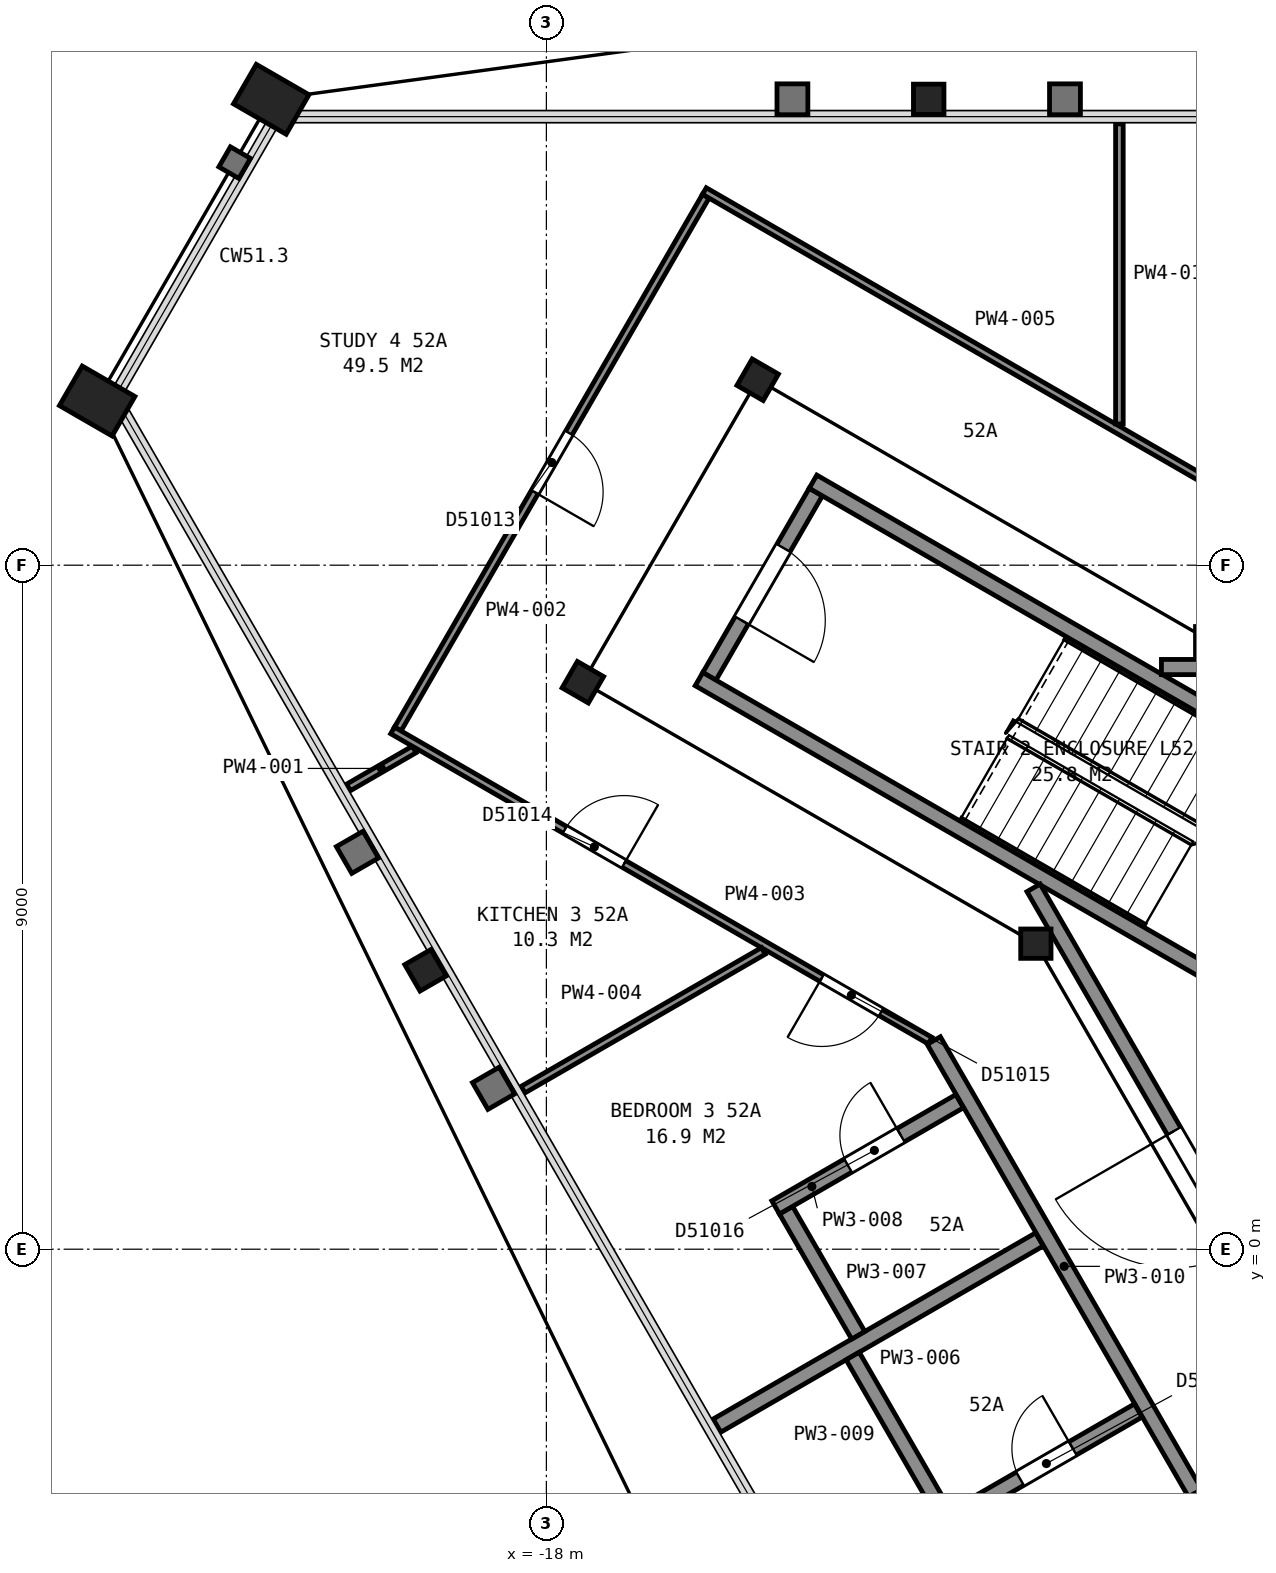
"""IFC4 building model, lengths in metres.
Left out: names, types, materials, properties, quantities, classifications, styles, units other than length and angle.
Written with IfcOpenShell. Run it as: python <this file> out.ifc"""

import sys

from ifc_helpers import new_model, si_unit, direction, frame, frame_2d, origin, origin_2d, place, context, subcontext, project, spatial, rectangle, hollow_rectangle, i_section, extrude, element, fill, save


model = new_model("IFC4")
c1 = context("Model", 3, precision=1e-05, world=origin(), true_north=direction((0.0, 1.0)))
c2 = subcontext(c1, "Body", "Model", "MODEL_VIEW")
j1 = project(units=[si_unit("LENGTHUNIT", "METRE"), si_unit("PLANEANGLEUNIT", "RADIAN")], contexts=[c1])
p1 = place(None, origin())
s1 = spatial("IfcSite", under=j1, at=p1, CompositionType="ELEMENT")
p2 = place(p1, origin())
s2 = spatial("IfcBuilding", under=s1, at=p2, CompositionType="ELEMENT")
p3 = place(p2, frame((0.0, 0.0, 210.1)))
s3 = spatial("IfcBuildingStorey", under=s2, at=p3, CompositionType="ELEMENT", Elevation=210.1)
p4 = place(p3, frame((-12.97, 15.13, 0.0), z_axis=(0.0, 0.0, 1.0), x_axis=(1.0, 0.0, 0.0)))
e1 = element("IfcColumn", 1, at=p4, inside=s3, PredefinedType="COLUMN", context=c2, shape_type="SweptSolid", body=[
    extrude(i_section(OverallWidth=0.401, OverallDepth=0.399, WebThickness=0.025, FlangeThickness=0.04, FilletRadius=0.015, at=origin_2d()), origin(), (0.0, 0.0, 1.0), 3.66),
])
for number, where, z_axis, x_axis in (
    (2, (-21.62, 15.13, 0.0), (0.0, 0.0, 1.0), (0.5, 0.866, 0.0)),
    (3, (-23.91, 11.16, 0.0), (0.0, 0.0, 1.0), (0.5, 0.866, 0.0)),
):
    element("IfcColumn", number, at=place(p3, frame(where, z_axis=z_axis, x_axis=x_axis)), inside=s3, PredefinedType="COLUMN", context=c2, shape_type="SweptSolid", body=[
        extrude(hollow_rectangle(XDim=0.6, YDim=0.8, WallThickness=0.05, at=origin_2d()), origin(), (0.0, 0.0, 1.0), 3.635),
    ])
p5 = place(p3, frame((-19.59, 3.67, 0.0), z_axis=(0.0, 0.0, 1.0), x_axis=(-0.5, 0.866025403784, 0.0)))
e4 = element("IfcColumn", 4, at=p5, inside=s3, PredefinedType="COLUMN", context=c2, shape_type="SweptSolid", body=[
    extrude(i_section(OverallWidth=0.401, OverallDepth=0.399, WebThickness=0.025, FlangeThickness=0.04, FilletRadius=0.015, at=origin_2d()), origin(), (0.0, 0.0, 1.0), 3.66),
])
for number, where, z_axis, x_axis in (
    (5, (-15.22, 11.44, 0.0), (0.0, 0.0, 1.0), (0.5, 0.866, 0.0)),
    (6, (-17.52, 7.46, 0.0), (0.0, 0.0, 1.0), (0.5, 0.866, 0.0)),
):
    element("IfcColumn", number, at=place(p3, frame(where, z_axis=z_axis, x_axis=x_axis)), inside=s3, PredefinedType="COLUMN", context=c2, shape_type="SweptSolid", body=[
        extrude(i_section(OverallWidth=0.401, OverallDepth=0.399, WebThickness=0.025, FlangeThickness=0.04, FilletRadius=0.015, at=origin_2d()), origin(), (0.0, 0.0, 1.0), 3.7),
    ])
p6 = place(p3, frame((-11.56, 4.02, 0.0), z_axis=(0.0, 0.0, 1.0), x_axis=(1.0, 0.0, 0.0)))
e7 = element("IfcColumn", 7, at=p6, inside=s3, PredefinedType="COLUMN", context=c2, shape_type="SweptSolid", body=[
    extrude(i_section(OverallWidth=0.399, OverallDepth=0.386, WebThickness=0.021, FlangeThickness=0.033, FilletRadius=0.015, at=origin_2d()), origin(), (0.0, 0.0, 1.0), 3.7),
])
p7 = place(p3, frame((-14.455, 9.962, 0.0), z_axis=(0.0, 0.0, 1.0), x_axis=(-0.500049511043, -0.865996816683, 0.0)))
e8 = element("IfcWall", 8, at=p7, inside=s3, PredefinedType="PARTITIONING", context=c2, shape_type="SweptSolid", body=[
    extrude(rectangle(XDim=2.8, YDim=0.2, at=frame_2d((1.4, 0.0))), origin(), (0.0, 0.0, 1.0), 3.45),
])
p8 = place(p7, frame((0.85, 0.0, 0.0)))
e9 = element("IfcOpeningElement", 9, at=p8, cuts=e8, PredefinedType="OPENING", context=c2, shape_type="SweptSolid", body=[
    extrude(rectangle(XDim=1.1, YDim=2.1, at=frame_2d((0.55, 1.05))), frame((0.0, 0.11, 0.0), z_axis=(0.0, -1.0, 0.0), x_axis=(1.0, 0.0, 0.0)), (0.0, 0.0, 1.0), 0.22),
])
for number, where, z_axis, x_axis in (
    (10, (-7.678, 2.701, 0.0), (0.0, 0.0, 1.0), (-0.866, 0.5, 0.0)),
    (11, (-6.178, 5.299, 0.0), (0.0, 0.0, 1.0), (-0.866, 0.5, 0.0)),
):
    element("IfcWall", number, at=place(p3, frame(where, z_axis=z_axis, x_axis=x_axis)), inside=s3, PredefinedType="PARTITIONING", context=c2, shape_type="SweptSolid", body=[
        extrude(rectangle(XDim=9.6, YDim=0.2, at=frame_2d((4.8, 0.0))), origin(), (0.0, 0.0, 1.0), 3.45),
    ])
p9 = place(p3, frame((-11.591, 4.755, 0.0), z_axis=(0.0, 0.0, 1.0), x_axis=(0.500043977787, -0.866000011708, 0.0)))
e12 = element("IfcWall", 12, at=p9, inside=s3, PredefinedType="PARTITIONING", context=c2, shape_type="SweptSolid", body=[
    extrude(rectangle(XDim=6.617, YDim=0.2, at=frame_2d((3.308, 0.0))), origin(), (0.0, 0.0, 1.0), 3.45),
])
p10 = place(p9, frame((3.695, 0.0, 0.0)))
e13 = element("IfcOpeningElement", 13, at=p10, cuts=e12, PredefinedType="OPENING", context=c2, shape_type="SweptSolid", body=[
    extrude(rectangle(XDim=1.8, YDim=2.1, at=frame_2d((0.9, 1.05))), frame((0.0, 0.11, 0.0), z_axis=(0.0, -1.0, 0.0), x_axis=(1.0, 0.0, 0.0)), (0.0, 0.0, 1.0), 0.22),
])
p11 = place(p3, frame((-9.908, 7.66, 0.0), z_axis=(0.0, 0.0, 1.0), x_axis=(1.0, 0.0, 0.0)))
e14 = element("IfcWall", 14, at=p11, inside=s3, PredefinedType="PARTITIONING", context=c2, shape_type="SweptSolid", body=[
    extrude(rectangle(XDim=3.621, YDim=0.2, at=frame_2d((1.811, 0.0))), origin(), (0.0, 0.0, 1.0), 3.45),
])
p12 = place(p3, frame((-20.604, 6.076, 0.0), z_axis=(0.0, 0.0, 1.0), x_axis=(0.865855657918, 0.500293893279, 0.0)))
e15 = element("IfcWall", 15, at=p12, inside=s3, PredefinedType="PARTITIONING", context=c2, shape_type="SweptSolid", body=[
    extrude(rectangle(XDim=0.999, YDim=0.1, at=frame_2d((0.499, 0.0))), origin(), (0.0, 0.0, 1.0), 2.713),
])
p13 = place(p3, frame((-19.955, 6.844, 0.0), z_axis=(0.0, 0.0, 1.0), x_axis=(0.500415732313, 0.865785247537, 0.0)))
e16 = element("IfcWall", 16, at=p13, inside=s3, PredefinedType="PARTITIONING", context=c2, shape_type="SweptSolid", body=[
    extrude(rectangle(XDim=8.097, YDim=0.1, at=frame_2d((4.049, 0.0))), origin(), (0.0, 0.0, 1.0), 2.713),
])
p14 = place(p13, frame((3.6, 0.0, 0.0)))
e17 = element("IfcOpeningElement", 17, at=p14, cuts=e16, PredefinedType="OPENING", context=c2, shape_type="SweptSolid", body=[
    extrude(rectangle(XDim=0.9, YDim=2.1, at=frame_2d((0.45, 1.05))), frame((0.0, 0.06, 0.0), z_axis=(0.0, -1.0, 0.0), x_axis=(1.0, 0.0, 0.0)), (0.0, 0.0, 1.0), 0.12),
])
p15 = place(p3, frame((-12.952, 2.744, 0.0), z_axis=(0.0, 0.0, 1.0), x_axis=(-0.86608949446, 0.499888975259, 0.0)))
e18 = element("IfcWall", 18, at=p15, inside=s3, PredefinedType="PARTITIONING", context=c2, shape_type="SweptSolid", body=[
    extrude(rectangle(XDim=8.165, YDim=0.1, at=frame_2d((4.083, 0.0))), origin(), (0.0, 0.0, 1.0), 2.713),
])
p16 = place(p15, frame((4.65, 0.0, 0.0)))
e19 = element("IfcOpeningElement", 19, at=p16, cuts=e18, PredefinedType="OPENING", context=c2, shape_type="SweptSolid", body=[
    extrude(rectangle(XDim=0.9, YDim=2.1, at=frame_2d((0.45, 1.05))), frame((0.0, 0.06, 0.0), z_axis=(0.0, -1.0, 0.0), x_axis=(1.0, 0.0, 0.0)), (0.0, 0.0, 1.0), 0.12),
])
p17 = place(p15, frame((0.746, 0.0, 0.0)))
e20 = element("IfcOpeningElement", 20, at=p17, cuts=e18, PredefinedType="OPENING", context=c2, shape_type="SweptSolid", body=[
    extrude(rectangle(XDim=0.9, YDim=2.1, at=frame_2d((0.45, 1.05))), frame((0.0, 0.06, 0.0), z_axis=(0.0, -1.0, 0.0), x_axis=(1.0, 0.0, 0.0)), (0.0, 0.0, 1.0), 0.12),
])
p18 = place(p3, frame((-18.308, 2.099, 0.0), z_axis=(0.0, 0.0, 1.0), x_axis=(0.866054218355, 0.499950088379, 0.0)))
e21 = element("IfcWall", 21, at=p18, inside=s3, PredefinedType="PARTITIONING", context=c2, shape_type="SweptSolid", body=[
    extrude(rectangle(XDim=3.652, YDim=0.1, at=frame_2d((1.826, 0.0))), origin(), (0.0, 0.0, 1.0), 2.713),
])
p19 = place(p3, frame((-15.921, 13.923, 0.0), z_axis=(0.0, 0.0, 1.0), x_axis=(0.866088973199, -0.499889878377, 0.0)))
e22 = element("IfcWall", 22, at=p19, inside=s3, PredefinedType="PARTITIONING", context=c2, shape_type="SweptSolid", body=[
    extrude(rectangle(XDim=8.163, YDim=0.1, at=frame_2d((4.082, 0.0))), origin(), (0.0, 0.0, 1.0), 2.713),
])
p20 = place(p3, frame((-15.756, -2.321, 0.0), z_axis=(0.0, 0.0, 1.0), x_axis=(0.866042025588, 0.499971209087, 0.0)))
e23 = element("IfcWall", 23, at=p20, inside=s3, PredefinedType="PARTITIONING", context=c2, shape_type="SweptSolid", body=[
    extrude(rectangle(XDim=4.899, YDim=0.2, at=frame_2d((2.45, 0.0))), origin(), (0.0, 0.0, 1.0), 2.713),
])
p21 = place(p3, frame((-14.847, 0.513, 0.0), z_axis=(0.0, 0.0, 1.0), x_axis=(0.499911523785, -0.866076479525, 0.0)))
e24 = element("IfcWall", 24, at=p21, inside=s3, PredefinedType="PARTITIONING", context=c2, shape_type="SweptSolid", body=[
    extrude(rectangle(XDim=1.9, YDim=0.2, at=frame_2d((0.95, 0.0))), origin(), (0.0, 0.0, 1.0), 2.713),
])
p22 = place(p3, frame((-12.563, 1.948, 0.0), z_axis=(0.0, 0.0, 1.0), x_axis=(-0.866041588165, -0.499971966783, 0.0)))
e25 = element("IfcWall", 25, at=p22, inside=s3, PredefinedType="PARTITIONING", context=c2, shape_type="SweptSolid", body=[
    extrude(rectangle(XDim=2.795, YDim=0.2, at=frame_2d((1.397, 0.0))), origin(), (0.0, 0.0, 1.0), 2.713),
])
p23 = place(p22, frame((0.895, 0.0, 0.0)))
e26 = element("IfcOpeningElement", 26, at=p23, cuts=e25, PredefinedType="OPENING", context=c2, shape_type="SweptSolid", body=[
    extrude(rectangle(XDim=0.8, YDim=2.1, at=frame_2d((0.4, 1.05))), frame((0.0, 0.11, 0.0), z_axis=(0.0, -1.0, 0.0), x_axis=(1.0, 0.0, 0.0)), (0.0, 0.0, 1.0), 0.22),
])
p24 = place(p3, frame((-13.97, -1.406, 0.0), z_axis=(0.0, 0.0, 1.0), x_axis=(0.499784123135, -0.866150004481, 0.0)))
e27 = element("IfcWall", 27, at=p24, inside=s3, PredefinedType="PARTITIONING", context=c2, shape_type="SweptSolid", body=[
    extrude(rectangle(XDim=2.399, YDim=0.2, at=frame_2d((1.199, 0.0))), origin(), (0.0, 0.0, 1.0), 2.713),
])
p25 = place(p3, frame((-4.075, -12.545, 0.0), z_axis=(0.0, 0.0, 1.0), x_axis=(-0.499999743747, 0.866025551732, 0.0)))
e28 = element("IfcWall", 28, at=p25, inside=s3, PredefinedType="PARTITIONING", context=c2, shape_type="SweptSolid", body=[
    extrude(rectangle(XDim=17.656, YDim=0.2, at=frame_2d((8.828, 0.0))), origin(), (0.0, 0.0, 1.0), 2.713),
])
p26 = place(p25, frame((9.895, 0.0, 0.0)))
e29 = element("IfcOpeningElement", 29, at=p26, cuts=e28, PredefinedType="OPENING", context=c2, shape_type="SweptSolid", body=[
    extrude(rectangle(XDim=0.9, YDim=2.1, at=frame_2d((0.45, 1.05))), frame((0.0, 0.11, 0.0), z_axis=(0.0, -1.0, 0.0), x_axis=(1.0, 0.0, 0.0)), (0.0, 0.0, 1.0), 0.22),
])
p27 = place(p25, frame((6.622, 0.0, 0.0)))
e30 = element("IfcOpeningElement", 30, at=p27, cuts=e28, PredefinedType="OPENING", context=c2, shape_type="SweptSolid", body=[
    extrude(rectangle(XDim=0.9, YDim=2.1, at=frame_2d((0.45, 1.05))), frame((0.0, 0.11, 0.0), z_axis=(0.0, -1.0, 0.0), x_axis=(1.0, 0.0, 0.0)), (0.0, 0.0, 1.0), 0.22),
])
p28 = place(p25, frame((0.268, 0.0, 0.0)))
e31 = element("IfcOpeningElement", 31, at=p28, cuts=e28, PredefinedType="OPENING", context=c2, shape_type="SweptSolid", body=[
    extrude(rectangle(XDim=0.9, YDim=2.1, at=frame_2d((0.45, 1.05))), frame((0.0, 0.11, 0.0), z_axis=(0.0, -1.0, 0.0), x_axis=(1.0, 0.0, 0.0)), (0.0, 0.0, 1.0), 0.22),
])
p29 = place(p3, frame((-12.808, -3.62, 0.0), z_axis=(0.0, 0.0, 1.0), x_axis=(0.866134024916, 0.499811815469, 0.0)))
e32 = element("IfcWall", 32, at=p29, inside=s3, PredefinedType="PARTITIONING", context=c2, shape_type="SweptSolid", body=[
    extrude(rectangle(XDim=2.996, YDim=0.2, at=frame_2d((1.498, 0.0))), origin(), (0.0, 0.0, 1.0), 2.713),
])
p30 = place(p29, frame((1.2, 0.0, 0.0)))
e33 = element("IfcOpeningElement", 33, at=p30, cuts=e32, PredefinedType="OPENING", context=c2, shape_type="SweptSolid", body=[
    extrude(rectangle(XDim=0.8, YDim=2.1, at=frame_2d((0.4, 1.05))), frame((0.0, 0.11, 0.0), z_axis=(0.0, -1.0, 0.0), x_axis=(1.0, 0.0, 0.0)), (0.0, 0.0, 1.0), 0.22),
])
p31 = place(p3, frame((-10.461, 10.859, 0.0), z_axis=(0.0, 0.0, 1.0), x_axis=(0.0, 1.0, 0.0)))
e34 = element("IfcWall", 34, at=p31, inside=s3, PredefinedType="PARTITIONING", context=c2, shape_type="SweptSolid", body=[
    extrude(rectangle(XDim=3.947, YDim=0.1, at=frame_2d((1.974, 0.0))), origin(), (0.0, 0.0, 1.0), 2.713),
])
p32 = place(p8, origin())
e35 = element("IfcDoor", 35, at=p32, inside=s3, OperationType="SINGLE_SWING_RIGHT", PredefinedType="DOOR", context=c2, shape_type="SweptSolid", body=[
    extrude(rectangle(XDim=1.1, YDim=2.1, at=frame_2d((0.55, 1.05))), frame((0.0, 0.025, 0.0), z_axis=(0.0, -1.0, 0.0), x_axis=(1.0, 0.0, 0.0)), (0.0, 0.0, 1.0), 0.05),
])
fill(e9, e35)
p33 = place(p10, origin())
e36 = element("IfcDoor", 36, at=p33, inside=s3, OperationType="DOUBLE_DOOR_SINGLE_SWING", PredefinedType="DOOR", context=c2, shape_type="SweptSolid", body=[
    extrude(rectangle(XDim=1.8, YDim=2.1, at=frame_2d((0.9, 1.05))), frame((0.0, 0.025, 0.0), z_axis=(0.0, -1.0, 0.0), x_axis=(1.0, 0.0, 0.0)), (0.0, 0.0, 1.0), 0.05),
])
fill(e13, e36)
p34 = place(p14, origin())
e37 = element("IfcDoor", 37, at=p34, inside=s3, OperationType="SINGLE_SWING_LEFT", PredefinedType="DOOR", context=c2, shape_type="SweptSolid", body=[
    extrude(rectangle(XDim=0.9, YDim=2.1, at=frame_2d((0.45, 1.05))), frame((0.0, 0.025, 0.0), z_axis=(0.0, -1.0, 0.0), x_axis=(1.0, 0.0, 0.0)), (0.0, 0.0, 1.0), 0.05),
])
fill(e17, e37)
p35 = place(p16, origin())
e38 = element("IfcDoor", 38, at=p35, inside=s3, OperationType="SINGLE_SWING_LEFT", PredefinedType="DOOR", context=c2, shape_type="SweptSolid", body=[
    extrude(rectangle(XDim=0.9, YDim=2.1, at=frame_2d((0.45, 1.05))), frame((0.0, 0.025, 0.0), z_axis=(0.0, -1.0, 0.0), x_axis=(1.0, 0.0, 0.0)), (0.0, 0.0, 1.0), 0.05),
])
fill(e19, e38)
p36 = place(p17, origin())
e39 = element("IfcDoor", 39, at=p36, inside=s3, OperationType="SINGLE_SWING_RIGHT", PredefinedType="DOOR", context=c2, shape_type="SweptSolid", body=[
    extrude(rectangle(XDim=0.9, YDim=2.1, at=frame_2d((0.45, 1.05))), frame((0.0, 0.025, 0.0), z_axis=(0.0, -1.0, 0.0), x_axis=(1.0, 0.0, 0.0)), (0.0, 0.0, 1.0), 0.05),
])
fill(e20, e39)
p37 = place(p23, origin())
e40 = element("IfcDoor", 40, at=p37, inside=s3, OperationType="SINGLE_SWING_LEFT", PredefinedType="DOOR", context=c2, shape_type="SweptSolid", body=[
    extrude(rectangle(XDim=0.8, YDim=2.1, at=frame_2d((0.4, 1.05))), frame((0.0, 0.025, 0.0), z_axis=(0.0, -1.0, 0.0), x_axis=(1.0, 0.0, 0.0)), (0.0, 0.0, 1.0), 0.05),
])
fill(e26, e40)
p38 = place(p26, origin())
e41 = element("IfcDoor", 41, at=p38, inside=s3, OperationType="SINGLE_SWING_RIGHT", PredefinedType="DOOR", context=c2, shape_type="SweptSolid", body=[
    extrude(rectangle(XDim=0.9, YDim=2.1, at=frame_2d((0.45, 1.05))), frame((0.0, 0.025, 0.0), z_axis=(0.0, -1.0, 0.0), x_axis=(1.0, 0.0, 0.0)), (0.0, 0.0, 1.0), 0.05),
])
fill(e29, e41)
p39 = place(p30, origin())
e42 = element("IfcDoor", 42, at=p39, inside=s3, OperationType="SINGLE_SWING_RIGHT", PredefinedType="DOOR", context=c2, shape_type="SweptSolid", body=[
    extrude(rectangle(XDim=0.8, YDim=2.1, at=frame_2d((0.4, 1.05))), frame((0.0, 0.025, 0.0), z_axis=(0.0, -1.0, 0.0), x_axis=(1.0, 0.0, 0.0)), (0.0, 0.0, 1.0), 0.05),
])
fill(e33, e42)
save(model, sys.argv[1])
